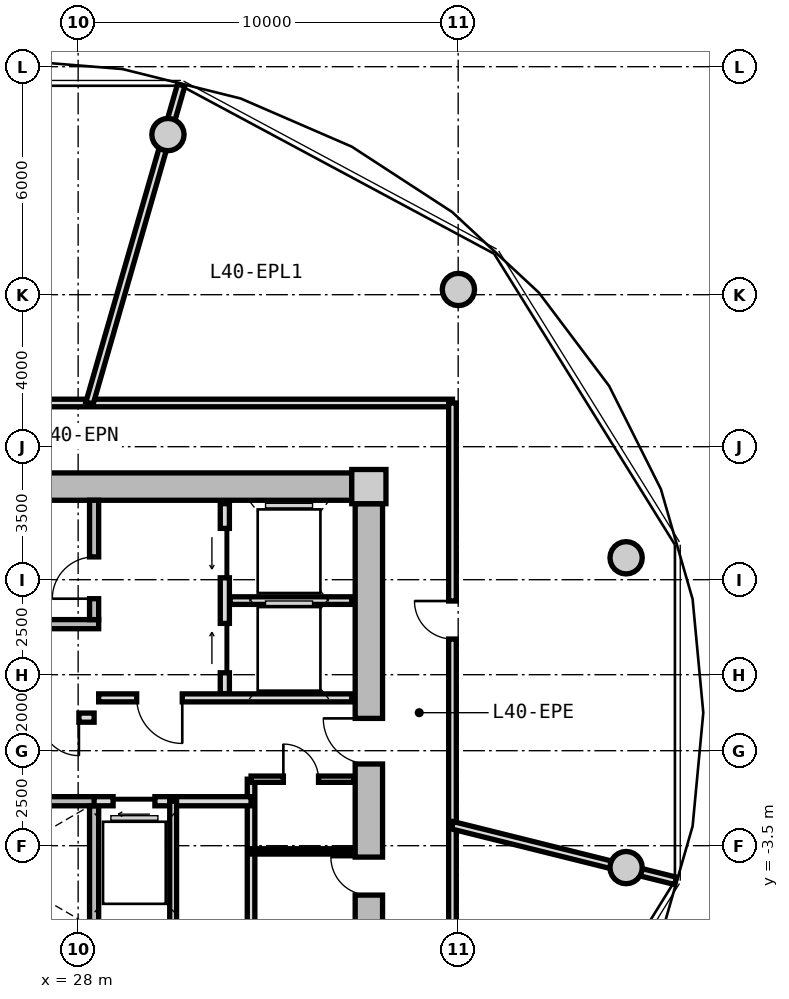
"""IFC4 building model, lengths in metres.
Left out: names, types, materials, properties, quantities, classifications, styles, units other than length and angle.
Written with IfcOpenShell. Run it as: python <this file> out.ifc"""

import sys

from ifc_helpers import new_model, si_unit, direction, frame, frame_2d, origin, origin_2d, place, context, subcontext, project, spatial, rectangle, circle, extrude, source, transform, mapped, element, fill, save


model = new_model("IFC4")
c1 = context("Model", 3, precision=1e-05, world=origin(), true_north=direction((0.0, 1.0)))
c2 = subcontext(c1, "Body", "Model", "MODEL_VIEW")
j1 = project(units=[si_unit("LENGTHUNIT", "METRE"), si_unit("PLANEANGLEUNIT", "RADIAN")], contexts=[c1])
p1 = place(None, origin())
s1 = spatial("IfcSite", under=j1, at=p1, CompositionType="ELEMENT")
p2 = place(p1, origin())
s2 = spatial("IfcBuilding", under=s1, at=p2, CompositionType="ELEMENT")
p3 = place(p2, frame((0.0, 0.0, 129.8)))
s3 = spatial("IfcBuildingStorey", under=s2, at=p3, CompositionType="ELEMENT", Elevation=129.8)
m1 = source(origin(), c2, "Body", "SweptSolid", [
    extrude(rectangle(XDim=0.9, YDim=0.9, at=origin_2d()), origin(), (0.0, 0.0, 1.0), 4.5),
])
p4 = place(p3, frame((35.65, 5.95, 0.0), z_axis=(0.0, 0.0, 1.0), x_axis=(1.0, 0.0, 0.0)))
e1 = element("IfcColumn", 1, at=p4, inside=s3, PredefinedType="COLUMN", context=c2, shape_type="MappedRepresentation", body=[
    mapped(m1, transform((0.0, 0.0, 0.0), x_axis=(1.0, 0.0, 0.0), y_axis=(0.0, 1.0, 0.0), z_axis=(0.0, 0.0, 1.0), scale=1.0)),
])
m2 = source(origin(), c2, "Body", "SweptSolid", [
    extrude(rectangle(XDim=14.4, YDim=0.72, at=frame_2d((7.2, 0.0))), origin(), (0.0, 0.0, 1.0), 4.08),
])
p5 = place(p3, frame((20.8, 5.95, 0.0), z_axis=(0.0, 0.0, 1.0), x_axis=(1.0, 0.0, 0.0)))
e2 = element("IfcWall", 2, at=p5, inside=s3, PredefinedType="SHEAR", context=c2, shape_type="MappedRepresentation", body=[
    mapped(m2, transform((0.0, 0.0, 0.0), x_axis=(1.0, 0.0, 0.0), y_axis=(0.0, 1.0, 0.0), z_axis=(0.0, 0.0, 1.0), scale=1.0)),
])
m3 = source(origin(), c2, "Body", "SweptSolid", [
    extrude(rectangle(XDim=11.0, YDim=0.72, at=frame_2d((5.5, 0.0))), origin(), (0.0, 0.0, 1.0), 4.08),
])
p6 = place(p3, frame((35.65, 5.5, 0.0), z_axis=(0.0, 0.0, 1.0), x_axis=(0.0, -1.0, 0.0)))
e3 = element("IfcWall", 3, at=p6, inside=s3, PredefinedType="SHEAR", context=c2, shape_type="MappedRepresentation", body=[
    mapped(m3, transform((0.0, 0.0, 0.0), x_axis=(1.0, 0.0, 0.0), y_axis=(0.0, 1.0, 0.0), z_axis=(0.0, 0.0, 1.0), scale=1.0)),
])
p7 = place(p6, frame((5.65, 0.0, 0.0)))
e4 = element("IfcOpeningElement", 4, at=p7, cuts=e3, PredefinedType="OPENING", context=c2, shape_type="SweptSolid", body=[
    extrude(rectangle(XDim=1.2, YDim=2.15, at=frame_2d((0.6, 1.075))), frame((0.0, 0.37, 0.0), z_axis=(0.0, -1.0, 0.0), x_axis=(1.0, 0.0, 0.0)), (0.0, 0.0, 1.0), 0.74),
])
p8 = place(p6, frame((9.3, 0.0, 0.0)))
e5 = element("IfcOpeningElement", 5, at=p8, cuts=e3, PredefinedType="OPENING", context=c2, shape_type="SweptSolid", body=[
    extrude(rectangle(XDim=1.0, YDim=2.1, at=frame_2d((0.5, 1.05))), frame((0.0, 0.37, 0.0), z_axis=(0.0, -1.0, 0.0), x_axis=(1.0, 0.0, 0.0)), (0.0, 0.0, 1.0), 0.74),
])
m4 = source(origin(), c2, "Body", "SweptSolid", [
    extrude(circle(Radius=0.425, at=origin_2d()), origin(), (0.0, 0.0, 1.0), 4.08),
])
for number, where, z_axis, x_axis in (
    (6, (42.419, 4.076, 0.0), (0.0, 0.0, 1.0), (1.0, 0.0, 0.0)),
    (7, (38.006, 11.137, 0.0), (0.0, 0.0, 1.0), (1.0, 0.0, 0.0)),
    (8, (30.363, 15.213, 0.0), (0.0, 0.0, 1.0), (1.0, 0.0, 0.0)),
    (9, (42.419, -4.076, 0.0), (0.0, 0.0, 1.0), (1.0, 0.0, 0.0)),
):
    element("IfcColumn", number, at=place(p3, frame(where, z_axis=z_axis, x_axis=x_axis)), inside=s3, PredefinedType="COLUMN", context=c2, shape_type="MappedRepresentation", body=[
        mapped(m4, transform((0.0, 0.0, 0.0), x_axis=(1.0, 0.0, 0.0), y_axis=(0.0, 1.0, 0.0), z_axis=(0.0, 0.0, 1.0), scale=1.0)),
    ])
m5 = source(origin(), c2, "Body", "SweptSolid", [
    extrude(rectangle(XDim=7.83, YDim=0.24, at=frame_2d((3.915, 0.0))), origin(), (0.0, 0.0, 1.0), 4.08),
])
p9 = place(p3, frame((20.71, 2.33, 0.0), z_axis=(0.0, 0.0, 1.0), x_axis=(1.0, 0.0, 0.0)))
e10 = element("IfcWall", 10, at=p9, inside=s3, PredefinedType="PARTITIONING", context=c2, shape_type="MappedRepresentation", body=[
    mapped(m5, transform((0.0, 0.0, 0.0), x_axis=(1.0, 0.0, 0.0), y_axis=(0.0, 1.0, 0.0), z_axis=(0.0, 0.0, 1.0), scale=1.0)),
])
m6 = source(origin(), c2, "Body", "SweptSolid", [
    extrude(rectangle(XDim=3.14, YDim=0.24, at=frame_2d((1.57, 0.0))), origin(), (0.0, 0.0, 1.0), 4.08),
])
p10 = place(p3, frame((28.42, 2.45, 0.0), z_axis=(0.0, 0.0, 1.0), x_axis=(0.0, 1.0, 0.0)))
e11 = element("IfcWall", 11, at=p10, inside=s3, PredefinedType="PARTITIONING", context=c2, shape_type="MappedRepresentation", body=[
    mapped(m6, transform((0.0, 0.0, 0.0), x_axis=(1.0, 0.0, 0.0), y_axis=(0.0, 1.0, 0.0), z_axis=(0.0, 0.0, 1.0), scale=1.0)),
])
p11 = place(p10, frame((0.55, 0.0, 0.0)))
e12 = element("IfcOpeningElement", 12, at=p11, cuts=e11, PredefinedType="OPENING", context=c2, shape_type="SweptSolid", body=[
    extrude(rectangle(XDim=1.1, YDim=2.15, at=frame_2d((0.55, 1.075))), frame((0.0, 0.13, 0.0), z_axis=(0.0, -1.0, 0.0), x_axis=(1.0, 0.0, 0.0)), (0.0, 0.0, 1.0), 0.26),
])
p12 = place(p3, frame((20.71, -2.33, 0.0), z_axis=(0.0, 0.0, 1.0), x_axis=(1.0, 0.0, 0.0)))
e13 = element("IfcWall", 13, at=p12, inside=s3, PredefinedType="PARTITIONING", context=c2, shape_type="MappedRepresentation", body=[
    mapped(m5, transform((0.0, 0.0, 0.0), x_axis=(1.0, 0.0, 0.0), y_axis=(0.0, 1.0, 0.0), z_axis=(0.0, 0.0, 1.0), scale=1.0)),
])
p13 = place(p12, frame((0.95, 0.0, 0.0)))
e14 = element("IfcOpeningElement", 14, at=p13, cuts=e13, PredefinedType="OPENING", context=c2, shape_type="SweptSolid", body=[
    extrude(rectangle(XDim=1.1, YDim=2.15, at=frame_2d((0.55, 1.075))), frame((0.0, 0.13, 0.0), z_axis=(0.0, -1.0, 0.0), x_axis=(1.0, 0.0, 0.0)), (0.0, 0.0, 1.0), 0.26),
])
p14 = place(p3, frame((28.42, -5.59, 0.0), z_axis=(0.0, 0.0, 1.0), x_axis=(0.0, 1.0, 0.0)))
e15 = element("IfcWall", 15, at=p14, inside=s3, PredefinedType="PARTITIONING", context=c2, shape_type="MappedRepresentation", body=[
    mapped(m6, transform((0.0, 0.0, 0.0), x_axis=(1.0, 0.0, 0.0), y_axis=(0.0, 1.0, 0.0), z_axis=(0.0, 0.0, 1.0), scale=1.0)),
])
m7 = source(origin(), c2, "Body", "SweptSolid", [
    extrude(rectangle(XDim=5.0, YDim=0.24, at=frame_2d((2.5, 0.0))), origin(), (0.0, 0.0, 1.0), 4.065),
])
p15 = place(p3, frame((31.86, 0.5, 0.0), z_axis=(0.0, 0.0, 1.0), x_axis=(0.0, 1.0, 0.0)))
e16 = element("IfcWall", 16, at=p15, inside=s3, PredefinedType="PARTITIONING", context=c2, shape_type="MappedRepresentation", body=[
    mapped(m7, transform((0.0, 0.0, 0.0), x_axis=(1.0, 0.0, 0.0), y_axis=(0.0, 1.0, 0.0), z_axis=(0.0, 0.0, 1.0), scale=1.0)),
])
p16 = place(p15, frame((3.05, 0.0, 0.0)))
e17 = element("IfcOpeningElement", 17, at=p16, cuts=e16, PredefinedType="OPENING", context=c2, shape_type="SweptSolid", body=[
    extrude(rectangle(XDim=1.3, YDim=2.2, at=frame_2d((0.65, 1.1))), frame((0.0, 0.13, 0.0), z_axis=(0.0, -1.0, 0.0), x_axis=(1.0, 0.0, 0.0)), (0.0, 0.0, 1.0), 0.26),
])
p17 = place(p15, frame((0.55, 0.0, 0.0)))
e18 = element("IfcOpeningElement", 18, at=p17, cuts=e16, PredefinedType="OPENING", context=c2, shape_type="SweptSolid", body=[
    extrude(rectangle(XDim=1.3, YDim=2.2, at=frame_2d((0.65, 1.1))), frame((0.0, 0.13, 0.0), z_axis=(0.0, -1.0, 0.0), x_axis=(1.0, 0.0, 0.0)), (0.0, 0.0, 1.0), 0.26),
])
m8 = source(origin(), c2, "Body", "SweptSolid", [
    extrude(rectangle(XDim=3.2, YDim=0.2, at=frame_2d((1.6, 0.0))), origin(), (0.0, 0.0, 1.0), 4.065),
])
p18 = place(p3, frame((32.0, 2.95, 0.0), z_axis=(0.0, 0.0, 1.0), x_axis=(1.0, 0.0, 0.0)))
e19 = element("IfcWall", 19, at=p18, inside=s3, PredefinedType="PARTITIONING", context=c2, shape_type="MappedRepresentation", body=[
    mapped(m8, transform((0.0, 0.0, 0.0), x_axis=(1.0, 0.0, 0.0), y_axis=(0.0, 1.0, 0.0), z_axis=(0.0, 0.0, 1.0), scale=1.0)),
])
m9 = source(origin(), c2, "Body", "SweptSolid", [
    extrude(rectangle(XDim=6.66, YDim=0.21, at=frame_2d((3.33, 0.0))), origin(), (0.0, 0.0, 1.0), 4.065),
])
p19 = place(p3, frame((28.54, 0.39, 0.0), z_axis=(0.0, 0.0, 1.0), x_axis=(1.0, 0.0, 0.0)))
e20 = element("IfcWall", 20, at=p19, inside=s3, PredefinedType="PARTITIONING", context=c2, shape_type="MappedRepresentation", body=[
    mapped(m9, transform((0.0, 0.0, 0.0), x_axis=(1.0, 0.0, 0.0), y_axis=(0.0, 1.0, 0.0), z_axis=(0.0, 0.0, 1.0), scale=1.0)),
])
p20 = place(p19, frame((1.0, 0.0, 0.0)))
e21 = element("IfcOpeningElement", 21, at=p20, cuts=e20, PredefinedType="OPENING", context=c2, shape_type="SweptSolid", body=[
    extrude(rectangle(XDim=1.2, YDim=2.15, at=frame_2d((0.6, 1.075))), frame((0.0, 0.115, 0.0), z_axis=(0.0, -1.0, 0.0), x_axis=(1.0, 0.0, 0.0)), (0.0, 0.0, 1.0), 0.23),
])
m10 = source(origin(), c2, "Body", "SweptSolid", [
    extrude(rectangle(XDim=7.62, YDim=0.24, at=frame_2d((3.81, 0.0))), origin(), (0.0, 0.0, 1.0), 4.065),
])
p21 = place(p3, frame((20.8, -0.13, 0.0), z_axis=(0.0, 0.0, 1.0), x_axis=(1.0, 0.0, 0.0)))
e22 = element("IfcWall", 22, at=p21, inside=s3, PredefinedType="PARTITIONING", context=c2, shape_type="MappedRepresentation", body=[
    mapped(m10, transform((0.0, 0.0, 0.0), x_axis=(1.0, 0.0, 0.0), y_axis=(0.0, 1.0, 0.0), z_axis=(0.0, 0.0, 1.0), scale=1.0)),
])
p22 = place(p21, frame((6.22, 0.0, 0.0)))
e23 = element("IfcOpeningElement", 23, at=p22, cuts=e22, PredefinedType="OPENING", context=c2, shape_type="SweptSolid", body=[
    extrude(rectangle(XDim=1.0, YDim=2.1, at=frame_2d((0.5, 1.05))), frame((0.0, 0.13, 0.0), z_axis=(0.0, -1.0, 0.0), x_axis=(1.0, 0.0, 0.0)), (0.0, 0.0, 1.0), 0.26),
])
p23 = place(p21, frame((2.4, 0.0, 0.0)))
e24 = element("IfcOpeningElement", 24, at=p23, cuts=e22, PredefinedType="OPENING", context=c2, shape_type="SweptSolid", body=[
    extrude(rectangle(XDim=1.0, YDim=2.1, at=frame_2d((0.5, 1.05))), frame((0.0, 0.13, 0.0), z_axis=(0.0, -1.0, 0.0), x_axis=(1.0, 0.0, 0.0)), (0.0, 0.0, 1.0), 0.26),
])
m11 = source(origin(), c2, "Body", "SweptSolid", [
    extrude(rectangle(XDim=3.8, YDim=0.2, at=frame_2d((1.9, 0.0))), origin(), (0.0, 0.0, 1.0), 4.065),
])
p24 = place(p3, frame((32.55, -5.55, 0.0), z_axis=(0.0, 0.0, 1.0), x_axis=(0.0, 1.0, 0.0)))
e25 = element("IfcWall", 25, at=p24, inside=s3, PredefinedType="PARTITIONING", context=c2, shape_type="MappedRepresentation", body=[
    mapped(m11, transform((0.0, 0.0, 0.0), x_axis=(1.0, 0.0, 0.0), y_axis=(0.0, 1.0, 0.0), z_axis=(0.0, 0.0, 1.0), scale=1.0)),
])
m12 = source(origin(), c2, "Body", "SweptSolid", [
    extrude(rectangle(XDim=4.13, YDim=0.24, at=frame_2d((2.065, 0.0))), origin(), (0.0, 0.0, 1.0), 4.065),
])
p25 = place(p3, frame((28.42, -2.33, 0.0), z_axis=(0.0, 0.0, 1.0), x_axis=(1.0, 0.0, 0.0)))
e26 = element("IfcWall", 26, at=p25, inside=s3, PredefinedType="PARTITIONING", context=c2, shape_type="MappedRepresentation", body=[
    mapped(m12, transform((0.0, 0.0, 0.0), x_axis=(1.0, 0.0, 0.0), y_axis=(0.0, 1.0, 0.0), z_axis=(0.0, 0.0, 1.0), scale=1.0)),
])
p26 = place(p25, frame((0.5, 0.0, 0.0)))
e27 = element("IfcOpeningElement", 27, at=p26, cuts=e26, PredefinedType="OPENING", context=c2, shape_type="SweptSolid", body=[
    extrude(rectangle(XDim=1.1, YDim=2.2, at=frame_2d((0.55, 1.1))), frame((0.0, 0.13, 0.0), z_axis=(0.0, -1.0, 0.0), x_axis=(1.0, 0.0, 0.0)), (0.0, 0.0, 1.0), 0.26),
])
m13 = source(origin(), c2, "Body", "SweptSolid", [
    extrude(rectangle(XDim=3.22, YDim=0.18, at=frame_2d((1.61, 0.0))), origin(), (0.0, 0.0, 1.0), 4.065),
])
p27 = place(p3, frame((30.5, -5.55, 0.0), z_axis=(0.0, 0.0, 1.0), x_axis=(0.0, 1.0, 0.0)))
e28 = element("IfcWall", 28, at=p27, inside=s3, PredefinedType="PARTITIONING", context=c2, shape_type="MappedRepresentation", body=[
    mapped(m13, transform((0.0, 0.0, 0.0), x_axis=(1.0, 0.0, 0.0), y_axis=(0.0, 1.0, 0.0), z_axis=(0.0, 0.0, 1.0), scale=1.0)),
])
m14 = source(origin(), c2, "Body", "SweptSolid", [
    extrude(rectangle(XDim=2.7, YDim=0.165, at=frame_2d((1.35, 0.0))), origin(), (0.0, 0.0, 1.0), 4.065),
])
p28 = place(p3, frame((32.55, -1.75, 0.0), z_axis=(0.0, 0.0, 1.0), x_axis=(1.0, 0.0, 0.0)))
e29 = element("IfcWall", 29, at=p28, inside=s3, PredefinedType="PARTITIONING", context=c2, shape_type="MappedRepresentation", body=[
    mapped(m14, transform((0.0, 0.0, 0.0), x_axis=(1.0, 0.0, 0.0), y_axis=(0.0, 1.0, 0.0), z_axis=(0.0, 0.0, 1.0), scale=1.0)),
])
p29 = place(p28, frame((0.85, 0.0, 0.0)))
e30 = element("IfcOpeningElement", 30, at=p29, cuts=e29, PredefinedType="OPENING", context=c2, shape_type="SweptSolid", body=[
    extrude(rectangle(XDim=0.925, YDim=2.1, at=frame_2d((0.462, 1.05))), frame((0.0, 0.093, 0.0), z_axis=(0.0, -1.0, 0.0), x_axis=(1.0, 0.0, 0.0)), (0.0, 0.0, 1.0), 0.185),
])
m15 = source(origin(), c2, "Body", "SweptSolid", [
    extrude(rectangle(XDim=2.7, YDim=0.14, at=frame_2d((1.35, 0.0))), origin(), (0.0, 0.0, 1.0), 4.065),
])
p30 = place(p3, frame((32.55, -3.65, 0.0), z_axis=(0.0, 0.0, 1.0), x_axis=(1.0, 0.0, 0.0)))
e31 = element("IfcWall", 31, at=p30, inside=s3, PredefinedType="PARTITIONING", context=c2, shape_type="MappedRepresentation", body=[
    mapped(m15, transform((0.0, 0.0, 0.0), x_axis=(1.0, 0.0, 0.0), y_axis=(0.0, 1.0, 0.0), z_axis=(0.0, 0.0, 1.0), scale=1.0)),
])
m16 = source(origin(), c2, "Body", "SweptSolid", [
    extrude(rectangle(XDim=19.7, YDim=0.2, at=frame_2d((9.85, 0.0))), origin(), (0.0, 0.0, 1.0), 4.065),
])
p31 = place(p3, frame((18.15, 8.15, 0.0), z_axis=(0.0, 0.0, 1.0), x_axis=(1.0, 0.0, 0.0)))
e32 = element("IfcWall", 32, at=p31, inside=s3, PredefinedType="PARTITIONING", context=c2, shape_type="MappedRepresentation", body=[
    mapped(m16, transform((0.0, 0.0, 0.0), x_axis=(1.0, 0.0, 0.0), y_axis=(0.0, 1.0, 0.0), z_axis=(0.0, 0.0, 1.0), scale=1.0)),
])
p32 = place(p31, frame((4.711, 0.0, 0.0)))
e33 = element("IfcOpeningElement", 33, at=p32, cuts=e32, PredefinedType="OPENING", context=c2, shape_type="SweptSolid", body=[
    extrude(rectangle(XDim=1.0, YDim=2.1, at=frame_2d((0.5, 1.05))), frame((0.0, 0.11, 0.0), z_axis=(0.0, -1.0, 0.0), x_axis=(1.0, 0.0, 0.0)), (0.0, 0.0, 1.0), 0.22),
])
m17 = source(origin(), c2, "Body", "SweptSolid", [
    extrude(rectangle(XDim=16.3, YDim=0.2, at=frame_2d((8.15, 0.0))), origin(), (0.0, 0.0, 1.0), 4.065),
])
p33 = place(p3, frame((37.85, 8.15, 0.0), z_axis=(0.0, 0.0, 1.0), x_axis=(0.0, -1.0, 0.0)))
e34 = element("IfcWall", 34, at=p33, inside=s3, PredefinedType="PARTITIONING", context=c2, shape_type="MappedRepresentation", body=[
    mapped(m17, transform((0.0, 0.0, 0.0), x_axis=(1.0, 0.0, 0.0), y_axis=(0.0, 1.0, 0.0), z_axis=(0.0, 0.0, 1.0), scale=1.0)),
])
p34 = place(p33, frame((5.211, 0.0, 0.0)))
e35 = element("IfcOpeningElement", 35, at=p34, cuts=e34, PredefinedType="OPENING", context=c2, shape_type="SweptSolid", body=[
    extrude(rectangle(XDim=1.0, YDim=2.1, at=frame_2d((0.5, 1.05))), frame((0.0, 0.11, 0.0), z_axis=(0.0, -1.0, 0.0), x_axis=(1.0, 0.0, 0.0)), (0.0, 0.0, 1.0), 0.22),
])
m18 = source(origin(), c2, "Body", "SweptSolid", [
    extrude(rectangle(XDim=6.052, YDim=0.2, at=frame_2d((3.026, 0.0))), origin(), (0.0, 0.0, 1.0), 4.065),
])
p35 = place(p3, frame((37.85, -2.963, 0.0), z_axis=(0.0, 0.0, 1.0), x_axis=(0.970369863069, -0.24162435483, 0.0)))
e36 = element("IfcWall", 36, at=p35, inside=s3, PredefinedType="PARTITIONING", context=c2, shape_type="MappedRepresentation", body=[
    mapped(m18, transform((0.0, 0.0, 0.0), x_axis=(1.0, 0.0, 0.0), y_axis=(0.0, 1.0, 0.0), z_axis=(0.0, 0.0, 1.0), scale=1.0)),
])
m19 = source(origin(), c2, "Body", "SweptSolid", [
    extrude(rectangle(XDim=8.708, YDim=0.2, at=frame_2d((4.354, 0.0))), origin(), (0.0, 0.0, 1.0), 2.515),
])
p36 = place(p3, frame((28.3, 8.15, 0.0), z_axis=(0.0, 0.0, 1.0), x_axis=(0.277019790717, 0.960864212858, 0.0)))
e37 = element("IfcWall", 37, at=p36, inside=s3, PredefinedType="PARTITIONING", context=c2, shape_type="MappedRepresentation", body=[
    mapped(m19, transform((0.0, 0.0, 0.0), x_axis=(1.0, 0.0, 0.0), y_axis=(0.0, 1.0, 0.0), z_axis=(0.0, 0.0, 1.0), scale=1.0)),
])
m20 = source(origin(), c2, "Body", "SweptSolid", [
    extrude(rectangle(XDim=1.1, YDim=2.15, at=frame_2d((0.55, 1.075))), frame((0.0, 0.025, 0.0), z_axis=(0.0, -1.0, 0.0), x_axis=(1.0, 0.0, 0.0)), (0.0, 0.0, 1.0), 0.05),
])
p37 = place(p11, origin())
e38 = element("IfcDoor", 38, at=p37, inside=s3, OperationType="SINGLE_SWING_LEFT", PredefinedType="DOOR", context=c2, shape_type="MappedRepresentation", body=[
    mapped(m20, transform((0.0, 0.0, 0.0), x_axis=(1.0, 0.0, 0.0), y_axis=(0.0, 1.0, 0.0), z_axis=(0.0, 0.0, 1.0), scale=1.0)),
])
fill(e12, e38)
m21 = source(origin(), c2, "Body", "SweptSolid", [
    extrude(rectangle(XDim=1.3, YDim=2.2, at=frame_2d((0.65, 1.1))), frame((0.0, 0.025, 0.0), z_axis=(0.0, -1.0, 0.0), x_axis=(1.0, 0.0, 0.0)), (0.0, 0.0, 1.0), 0.05),
])
p38 = place(p16, origin())
e39 = element("IfcDoor", 39, at=p38, inside=s3, OperationType="SLIDING_TO_LEFT", PredefinedType="DOOR", context=c2, shape_type="MappedRepresentation", body=[
    mapped(m21, transform((0.0, 0.0, 0.0), x_axis=(1.0, 0.0, 0.0), y_axis=(0.0, 1.0, 0.0), z_axis=(0.0, 0.0, 1.0), scale=1.0)),
])
fill(e17, e39)
p39 = place(p17, origin())
e40 = element("IfcDoor", 40, at=p39, inside=s3, OperationType="SLIDING_TO_RIGHT", PredefinedType="DOOR", context=c2, shape_type="MappedRepresentation", body=[
    mapped(m21, transform((0.0, 0.0, 0.0), x_axis=(1.0, 0.0, 0.0), y_axis=(0.0, 1.0, 0.0), z_axis=(0.0, 0.0, 1.0), scale=1.0)),
])
fill(e18, e40)
m22 = source(origin(), c2, "Body", "SweptSolid", [
    extrude(rectangle(XDim=1.2, YDim=2.15, at=frame_2d((0.6, 1.075))), frame((0.0, 0.025, 0.0), z_axis=(0.0, -1.0, 0.0), x_axis=(1.0, 0.0, 0.0)), (0.0, 0.0, 1.0), 0.05),
])
p40 = place(p20, frame((1.2, 0.0, 0.0), z_axis=(0.0, 0.0, 1.0), x_axis=(-1.0, 0.0, 0.0)))
e41 = element("IfcDoor", 41, at=p40, inside=s3, OperationType="SINGLE_SWING_LEFT", PredefinedType="DOOR", context=c2, shape_type="MappedRepresentation", body=[
    mapped(m22, transform((0.0, 0.0, 0.0), x_axis=(1.0, 0.0, 0.0), y_axis=(0.0, 1.0, 0.0), z_axis=(0.0, 0.0, 1.0), scale=1.0)),
])
fill(e21, e41)
p41 = place(p7, frame((1.2, 0.0, 0.0), z_axis=(0.0, 0.0, 1.0), x_axis=(-1.0, 0.0, 0.0)))
e42 = element("IfcDoor", 42, at=p41, inside=s3, OperationType="SINGLE_SWING_RIGHT", PredefinedType="DOOR", context=c2, shape_type="MappedRepresentation", body=[
    mapped(m22, transform((0.0, 0.0, 0.0), x_axis=(1.0, 0.0, 0.0), y_axis=(0.0, 1.0, 0.0), z_axis=(0.0, 0.0, 1.0), scale=1.0)),
])
fill(e4, e42)
m23 = source(origin(), c2, "Body", "SweptSolid", [
    extrude(rectangle(XDim=1.0, YDim=2.1, at=frame_2d((0.5, 1.05))), frame((0.0, 0.025, 0.0), z_axis=(0.0, -1.0, 0.0), x_axis=(1.0, 0.0, 0.0)), (0.0, 0.0, 1.0), 0.05),
])
p42 = place(p22, frame((1.0, 0.0, 0.0), z_axis=(0.0, 0.0, 1.0), x_axis=(-1.0, 0.0, 0.0)))
e43 = element("IfcDoor", 43, at=p42, inside=s3, OperationType="SINGLE_SWING_LEFT", PredefinedType="DOOR", context=c2, shape_type="MappedRepresentation", body=[
    mapped(m23, transform((0.0, 0.0, 0.0), x_axis=(1.0, 0.0, 0.0), y_axis=(0.0, 1.0, 0.0), z_axis=(0.0, 0.0, 1.0), scale=1.0)),
])
fill(e23, e43)
m24 = source(origin(), c2, "Body", "SweptSolid", [
    extrude(rectangle(XDim=1.1, YDim=2.2, at=frame_2d((0.55, 1.1))), frame((0.0, 0.025, 0.0), z_axis=(0.0, -1.0, 0.0), x_axis=(1.0, 0.0, 0.0)), (0.0, 0.0, 1.0), 0.05),
])
p43 = place(p26, frame((1.1, 0.0, 0.0), z_axis=(0.0, 0.0, 1.0), x_axis=(-1.0, 0.0, 0.0)))
e44 = element("IfcDoor", 44, at=p43, inside=s3, OperationType="SLIDING_TO_LEFT", PredefinedType="DOOR", context=c2, shape_type="MappedRepresentation", body=[
    mapped(m24, transform((0.0, 0.0, 0.0), x_axis=(1.0, 0.0, 0.0), y_axis=(0.0, 1.0, 0.0), z_axis=(0.0, 0.0, 1.0), scale=1.0)),
])
fill(e27, e44)
m25 = source(origin(), c2, "Body", "SweptSolid", [
    extrude(rectangle(XDim=0.925, YDim=2.1, at=frame_2d((0.462, 1.05))), frame((0.0, 0.025, 0.0), z_axis=(0.0, -1.0, 0.0), x_axis=(1.0, 0.0, 0.0)), (0.0, 0.0, 1.0), 0.05),
])
p44 = place(p29, origin())
e45 = element("IfcDoor", 45, at=p44, inside=s3, OperationType="SINGLE_SWING_LEFT", PredefinedType="DOOR", context=c2, shape_type="MappedRepresentation", body=[
    mapped(m25, transform((0.0, 0.0, 0.0), x_axis=(1.0, 0.0, 0.0), y_axis=(0.0, 1.0, 0.0), z_axis=(0.0, 0.0, 1.0), scale=1.0)),
])
fill(e30, e45)
p45 = place(p8, frame((1.0, 0.0, 0.0), z_axis=(0.0, 0.0, 1.0), x_axis=(-1.0, 0.0, 0.0)))
e46 = element("IfcDoor", 46, at=p45, inside=s3, OperationType="SINGLE_SWING_RIGHT", PredefinedType="DOOR", context=c2, shape_type="MappedRepresentation", body=[
    mapped(m23, transform((0.0, 0.0, 0.0), x_axis=(1.0, 0.0, 0.0), y_axis=(0.0, 1.0, 0.0), z_axis=(0.0, 0.0, 1.0), scale=1.0)),
])
fill(e5, e46)
p46 = place(p34, frame((1.0, 0.0, 0.0), z_axis=(0.0, 0.0, 1.0), x_axis=(-1.0, 0.0, 0.0)))
e47 = element("IfcDoor", 47, at=p46, inside=s3, OperationType="SINGLE_SWING_RIGHT", PredefinedType="DOOR", context=c2, shape_type="MappedRepresentation", body=[
    mapped(m23, transform((0.0, 0.0, 0.0), x_axis=(1.0, 0.0, 0.0), y_axis=(0.0, 1.0, 0.0), z_axis=(0.0, 0.0, 1.0), scale=1.0)),
])
fill(e35, e47)
save(model, sys.argv[1])
